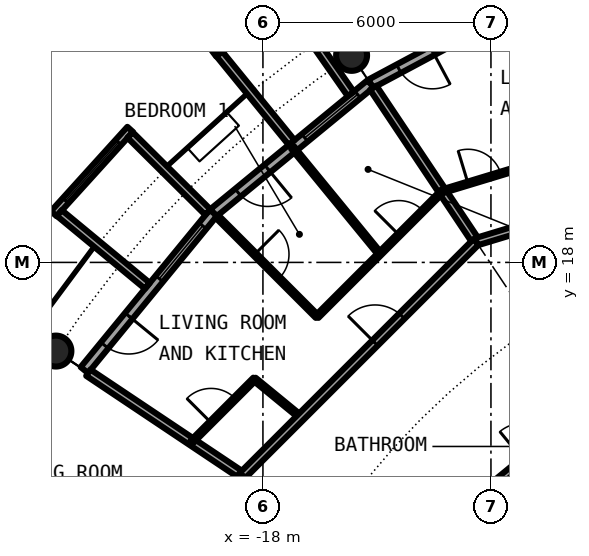
"""IFC4 building model, lengths in metres.
Left out: names, types, materials, properties, quantities, classifications, styles, units other than length and angle.
Written with IfcOpenShell. Run it as: python <this file> out.ifc"""

import sys

from ifc_helpers import new_model, si_unit, direction, frame, frame_2d, origin, origin_2d, place, context, subcontext, project, spatial, rectangle, circle, hollow_circle, extrude, element, fill, save


model = new_model("IFC4")
c1 = context("Model", 3, precision=1e-05, world=origin(), true_north=direction((0.0, 1.0)))
c2 = subcontext(c1, "Body", "Model", "MODEL_VIEW")
j1 = project(units=[si_unit("LENGTHUNIT", "METRE"), si_unit("PLANEANGLEUNIT", "RADIAN")], contexts=[c1])
p1 = place(None, origin())
s1 = spatial("IfcSite", under=j1, at=p1, CompositionType="ELEMENT")
p2 = place(p1, origin())
s2 = spatial("IfcBuilding", under=s1, at=p2, CompositionType="ELEMENT")
p3 = place(p2, frame((0.0, 0.0, 202.4)))
s3 = spatial("IfcBuildingStorey", under=s2, at=p3, CompositionType="ELEMENT", Elevation=202.4)
for number, where, z_axis, x_axis in (
    (1, (-15.667, 23.448, 0.0), (0.0, 0.0, 1.0), (1.0, 0.0, 0.0)),
    (2, (-23.448, 15.667, 0.0), (0.0, 0.0, 1.0), (1.0, 0.0, 0.0)),
):
    element("IfcColumn", number, at=place(p3, frame(where, z_axis=z_axis, x_axis=x_axis)), inside=s3, PredefinedType="COLUMN", context=c2, shape_type="SweptSolid", body=[
        extrude(hollow_circle(Radius=0.406, WallThickness=0.03, at=origin_2d()), origin(), (0.0, 0.0, 1.0), 3.05),
    ])
p4 = place(p3, frame((-10.447, 25.222, 0.0), z_axis=(0.0, 0.0, 1.0), x_axis=(-0.881915646801, -0.471407246368, 0.0)))
e3 = element("IfcWall", 3, at=p4, inside=s3, PredefinedType="SOLIDWALL", context=c2, shape_type="SweptSolid", body=[
    extrude(rectangle(XDim=5.352, YDim=0.25, at=frame_2d((2.676, 0.0))), origin(), (0.0, 0.0, 1.0), 2.7),
])
p5 = place(p4, frame((0.441, 0.0, 0.3)))
e4 = element("IfcOpeningElement", 4, at=p5, cuts=e3, PredefinedType="OPENING", context=c2, shape_type="SweptSolid", body=[
    extrude(rectangle(XDim=1.8, YDim=2.1, at=frame_2d((0.9, 1.05))), frame((0.0, 0.135, 0.0), z_axis=(0.0, -1.0, 0.0), x_axis=(1.0, 0.0, 0.0)), (0.0, 0.0, 1.0), 0.27),
])
p6 = place(p4, frame((3.51, 0.0, 0.0)))
e5 = element("IfcOpeningElement", 5, at=p6, cuts=e3, PredefinedType="OPENING", context=c2, shape_type="SweptSolid", body=[
    extrude(rectangle(XDim=1.0, YDim=2.2, at=frame_2d((0.5, 1.1))), frame((0.0, 0.135, 0.0), z_axis=(0.0, -1.0, 0.0), x_axis=(1.0, 0.0, 0.0)), (0.0, 0.0, 1.0), 0.27),
])
p7 = place(p3, frame((-15.167, 22.699, 0.0), z_axis=(0.0, 0.0, 1.0), x_axis=(-0.773019449054, -0.634382322723, 0.0)))
e6 = element("IfcWall", 6, at=p7, inside=s3, PredefinedType="SOLIDWALL", context=c2, shape_type="SweptSolid", body=[
    extrude(rectangle(XDim=5.352, YDim=0.25, at=frame_2d((2.676, 0.0))), origin(), (0.0, 0.0, 1.0), 2.7),
])
p8 = place(p7, frame((0.441, 0.0, 0.3)))
e7 = element("IfcOpeningElement", 7, at=p8, cuts=e6, PredefinedType="OPENING", context=c2, shape_type="SweptSolid", body=[
    extrude(rectangle(XDim=1.8, YDim=2.1, at=frame_2d((0.9, 1.05))), frame((0.0, 0.135, 0.0), z_axis=(0.0, -1.0, 0.0), x_axis=(1.0, 0.0, 0.0)), (0.0, 0.0, 1.0), 0.27),
])
p9 = place(p7, frame((3.51, 0.0, 0.0)))
e8 = element("IfcOpeningElement", 8, at=p9, cuts=e6, PredefinedType="OPENING", context=c2, shape_type="SweptSolid", body=[
    extrude(rectangle(XDim=1.0, YDim=2.2, at=frame_2d((0.5, 1.1))), frame((0.0, 0.135, 0.0), z_axis=(0.0, -1.0, 0.0), x_axis=(1.0, 0.0, 0.0)), (0.0, 0.0, 1.0), 0.27),
])
p10 = place(p3, frame((-17.337, 24.972, -0.03), z_axis=(0.0, 0.0, 1.0), x_axis=(-0.797887588059, -0.602806268067, 0.0)))
e9 = element("IfcWall", 9, at=p10, inside=s3, PredefinedType="SOLIDWALL", context=c2, shape_type="SweptSolid", body=[
    extrude(rectangle(XDim=2.447, YDim=0.2, at=frame_2d((1.223, 0.0))), origin(), (0.0, 0.0, 1.0), 2.73),
])
p11 = place(p10, frame((0.183, 0.0, 0.33)))
e10 = element("IfcOpeningElement", 10, at=p11, cuts=e9, PredefinedType="OPENING", context=c2, shape_type="SweptSolid", body=[
    extrude(circle(Radius=1.04, at=frame_2d((1.04, 1.04))), frame((0.0, 0.11, 0.0), z_axis=(0.0, -1.0, 0.0), x_axis=(1.0, 0.0, 0.0)), (0.0, 0.0, 1.0), 0.22),
])
p12 = place(p3, frame((-15.688, 22.433, -0.03), z_axis=(0.0, 0.0, 1.0), x_axis=(-0.573260687834, 0.819373043115, 0.0)))
e11 = element("IfcWall", 11, at=p12, inside=s3, PredefinedType="SOLIDWALL", context=c2, shape_type="SweptSolid", body=[
    extrude(rectangle(XDim=2.925, YDim=0.2, at=frame_2d((1.463, 0.0))), origin(), (0.0, 0.0, 1.0), 2.73),
])
p13 = place(p3, frame((-17.246, 21.155, -0.03), z_axis=(0.0, 0.0, 1.0), x_axis=(-0.631741648902, 0.775179004516, 0.0)))
e12 = element("IfcWall", 12, at=p13, inside=s3, PredefinedType="SOLIDWALL", context=c2, shape_type="SweptSolid", body=[
    extrude(rectangle(XDim=3.006, YDim=0.2, at=frame_2d((1.503, 0.0))), origin(), (0.0, 0.0, 1.0), 2.73),
])
p14 = place(p3, frame((-19.304, 19.304, 0.0), z_axis=(0.0, 0.0, 1.0), x_axis=(-0.634382322723, -0.773019449054, 0.0)))
e13 = element("IfcWall", 13, at=p14, inside=s3, PredefinedType="SOLIDWALL", context=c2, shape_type="SweptSolid", body=[
    extrude(rectangle(XDim=5.352, YDim=0.25, at=frame_2d((2.676, 0.0))), origin(), (0.0, 0.0, 1.0), 2.7),
])
p15 = place(p14, frame((0.441, 0.0, 0.3)))
e14 = element("IfcOpeningElement", 14, at=p15, cuts=e13, PredefinedType="OPENING", context=c2, shape_type="SweptSolid", body=[
    extrude(rectangle(XDim=1.8, YDim=2.1, at=frame_2d((0.9, 1.05))), frame((0.0, 0.135, 0.0), z_axis=(0.0, -1.0, 0.0), x_axis=(1.0, 0.0, 0.0)), (0.0, 0.0, 1.0), 0.27),
])
p16 = place(p14, frame((3.51, 0.0, 0.0)))
e15 = element("IfcOpeningElement", 15, at=p16, cuts=e13, PredefinedType="OPENING", context=c2, shape_type="SweptSolid", body=[
    extrude(rectangle(XDim=1.0, YDim=2.2, at=frame_2d((0.5, 1.1))), frame((0.0, 0.135, 0.0), z_axis=(0.0, -1.0, 0.0), x_axis=(1.0, 0.0, 0.0)), (0.0, 0.0, 1.0), 0.27),
])
p17 = place(p3, frame((-21.493, 21.5, -0.03), z_axis=(0.0, 0.0, 1.0), x_axis=(-0.671506829416, -0.740998365753, 0.0)))
e16 = element("IfcWall", 16, at=p17, inside=s3, PredefinedType="SOLIDWALL", context=c2, shape_type="SweptSolid", body=[
    extrude(rectangle(XDim=2.993, YDim=0.2, at=frame_2d((1.497, 0.0))), origin(), (0.0, 0.0, 1.0), 2.73),
])
p18 = place(p17, frame((0.457, 0.0, 0.33)))
e17 = element("IfcOpeningElement", 17, at=p18, cuts=e16, PredefinedType="OPENING", context=c2, shape_type="SweptSolid", body=[
    extrude(circle(Radius=1.04, at=frame_2d((1.04, 1.04))), frame((0.0, 0.11, 0.0), z_axis=(0.0, -1.0, 0.0), x_axis=(1.0, 0.0, 0.0)), (0.0, 0.0, 1.0), 0.22),
])
p19 = place(p3, frame((-19.45, 19.323, -0.03), z_axis=(0.0, 0.0, 1.0), x_axis=(-0.709727076896, 0.704476739375, 0.0)))
e18 = element("IfcWall", 18, at=p19, inside=s3, PredefinedType="SOLIDWALL", context=c2, shape_type="SweptSolid", body=[
    extrude(rectangle(XDim=2.883, YDim=0.2, at=frame_2d((1.441, 0.0))), origin(), (0.0, 0.0, 1.0), 2.73),
])
p20 = place(p3, frame((-21.041, 17.384, -0.03), z_axis=(0.0, 0.0, 1.0), x_axis=(-0.770784861449, 0.63709551667, 0.0)))
e19 = element("IfcWall", 19, at=p20, inside=s3, PredefinedType="SOLIDWALL", context=c2, shape_type="SweptSolid", body=[
    extrude(rectangle(XDim=3.006, YDim=0.2, at=frame_2d((1.503, 0.0))), origin(), (0.0, 0.0, 1.0), 2.73),
])
p21 = place(p3, frame((-18.224, 14.927, 0.0), z_axis=(0.0, 0.0, 1.0), x_axis=(0.773446828454, -0.633861186344, 0.0)))
e20 = element("IfcWall", 20, at=p21, inside=s3, PredefinedType="PARTITIONING", context=c2, shape_type="SweptSolid", body=[
    extrude(rectangle(XDim=1.578, YDim=0.1, at=frame_2d((0.789, 0.0))), origin(), (0.0, 0.0, 1.0), 2.7),
])
p22 = place(p3, frame((-22.595, 15.098, 0.0), z_axis=(0.0, 0.0, 1.0), x_axis=(0.831387096605, -0.55569370664, 0.0)))
e21 = element("IfcWall", 21, at=p22, inside=s3, PredefinedType="PARTITIONING", context=c2, shape_type="SweptSolid", body=[
    extrude(rectangle(XDim=4.875, YDim=0.2, at=frame_2d((2.438, 0.0))), origin(), (0.0, 0.0, 1.0), 2.7),
])
p23 = place(p3, frame((-19.216, 19.216, 0.0), z_axis=(0.0, 0.0, 1.0), x_axis=(0.707106781187, -0.707106781187, 0.0)))
e22 = element("IfcWall", 22, at=p23, inside=s3, PredefinedType="PARTITIONING", context=c2, shape_type="SweptSolid", body=[
    extrude(rectangle(XDim=3.735, YDim=0.1, at=frame_2d((1.868, 0.0))), origin(), (0.0, 0.0, 1.0), 2.7),
])
p24 = place(p23, frame((1.417, 0.0, 0.0)))
e23 = element("IfcOpeningElement", 23, at=p24, cuts=e22, PredefinedType="OPENING", context=c2, shape_type="SweptSolid", body=[
    extrude(rectangle(XDim=0.9, YDim=2.3, at=frame_2d((0.45, 1.15))), frame((0.0, 0.06, 0.0), z_axis=(0.0, -1.0, 0.0), x_axis=(1.0, 0.0, 0.0)), (0.0, 0.0, 1.0), 0.12),
])
p25 = place(p3, frame((-17.22, 21.023, 0.0), z_axis=(0.0, 0.0, 1.0), x_axis=(0.633737383709, -0.773548271597, 0.0)))
e24 = element("IfcWall", 24, at=p25, inside=s3, PredefinedType="PARTITIONING", context=c2, shape_type="SweptSolid", body=[
    extrude(rectangle(XDim=3.618, YDim=0.1, at=frame_2d((1.809, 0.0))), origin(), (0.0, 0.0, 1.0), 2.7),
])
p26 = place(p3, frame((-15.098, 22.595, 0.0), z_axis=(0.0, 0.0, 1.0), x_axis=(0.55569370664, -0.831387096605, 0.0)))
e25 = element("IfcWall", 25, at=p26, inside=s3, PredefinedType="PARTITIONING", context=c2, shape_type="SweptSolid", body=[
    extrude(rectangle(XDim=4.875, YDim=0.2, at=frame_2d((2.438, 0.0))), origin(), (0.0, 0.0, 1.0), 2.7),
])
p27 = place(p3, frame((-14.717, 9.834, 0.0), z_axis=(0.0, 0.0, 1.0), x_axis=(0.773034536097, 0.634363938131, 0.0)))
e26 = element("IfcWall", 26, at=p27, inside=s3, PredefinedType="PARTITIONING", context=c2, shape_type="SweptSolid", body=[
    extrude(rectangle(XDim=10.277, YDim=0.2, at=frame_2d((5.138, 0.0))), origin(), (0.0, 0.0, 1.0), 2.7),
])
p28 = place(p27, frame((4.638, 0.0, 0.0)))
e27 = element("IfcOpeningElement", 27, at=p28, cuts=e26, PredefinedType="OPENING", context=c2, shape_type="SweptSolid", body=[
    extrude(rectangle(XDim=1.0, YDim=2.3, at=frame_2d((0.5, 1.15))), frame((0.0, 0.11, 0.0), z_axis=(0.0, -1.0, 0.0), x_axis=(1.0, 0.0, 0.0)), (0.0, 0.0, 1.0), 0.22),
])
p29 = place(p3, frame((-12.389, 18.542, 0.0), z_axis=(0.0, 0.0, 1.0), x_axis=(0.956994750783, 0.290105234311, 0.0)))
e28 = element("IfcWall", 28, at=p29, inside=s3, PredefinedType="PARTITIONING", context=c2, shape_type="SweptSolid", body=[
    extrude(rectangle(XDim=12.951, YDim=0.2, at=frame_2d((6.475, 0.0))), origin(), (0.0, 0.0, 1.0), 2.7),
])
p30 = place(p29, frame((5.974, 0.0, 0.0)))
e29 = element("IfcOpeningElement", 29, at=p30, cuts=e28, PredefinedType="OPENING", context=c2, shape_type="SweptSolid", body=[
    extrude(rectangle(XDim=1.0, YDim=2.3, at=frame_2d((0.5, 1.15))), frame((0.0, 0.11, 0.0), z_axis=(0.0, -1.0, 0.0), x_axis=(1.0, 0.0, 0.0)), (0.0, 0.0, 1.0), 0.22),
])
p31 = place(p3, frame((-18.542, 12.389, 0.0), z_axis=(0.0, 0.0, 1.0), x_axis=(0.707106781187, 0.707106781187, 0.0)))
e30 = element("IfcWall", 30, at=p31, inside=s3, PredefinedType="PARTITIONING", context=c2, shape_type="SweptSolid", body=[
    extrude(rectangle(XDim=8.702, YDim=0.2, at=frame_2d((4.351, 0.0))), origin(), (0.0, 0.0, 1.0), 2.7),
])
p32 = place(p31, frame((4.938, 0.0, 0.0)))
e31 = element("IfcOpeningElement", 31, at=p32, cuts=e30, PredefinedType="OPENING", context=c2, shape_type="SweptSolid", body=[
    extrude(rectangle(XDim=1.0, YDim=2.3, at=frame_2d((0.5, 1.15))), frame((0.0, 0.11, 0.0), z_axis=(0.0, -1.0, 0.0), x_axis=(1.0, 0.0, 0.0)), (0.0, 0.0, 1.0), 0.22),
])
p33 = place(p3, frame((-19.317, 10.915, 0.0), z_axis=(0.0, 0.0, 1.0), x_axis=(0.465359652486, 0.885121683068, 0.0)))
e32 = element("IfcWall", 32, at=p33, inside=s3, PredefinedType="PARTITIONING", context=c2, shape_type="SweptSolid", body=[
    extrude(rectangle(XDim=1.665, YDim=0.2, at=frame_2d((0.833, 0.0))), origin(), (0.0, 0.0, 1.0), 2.7),
])
p34 = place(p3, frame((-13.278, 19.872, 0.0), z_axis=(0.0, 0.0, 1.0), x_axis=(0.956994210955, 0.29010701508, 0.0)))
e33 = element("IfcWall", 33, at=p34, inside=s3, PredefinedType="PARTITIONING", context=c2, shape_type="SweptSolid", body=[
    extrude(rectangle(XDim=2.312, YDim=0.1, at=frame_2d((1.156, 0.0))), origin(), (0.0, 0.0, 1.0), 2.7),
])
p35 = place(p34, frame((0.706, 0.0, 0.0)))
e34 = element("IfcOpeningElement", 34, at=p35, cuts=e33, PredefinedType="OPENING", context=c2, shape_type="SweptSolid", body=[
    extrude(rectangle(XDim=0.9, YDim=2.3, at=frame_2d((0.45, 1.15))), frame((0.0, 0.06, 0.0), z_axis=(0.0, -1.0, 0.0), x_axis=(1.0, 0.0, 0.0)), (0.0, 0.0, 1.0), 0.12),
])
p36 = place(p3, frame((-19.867, 13.283, 0.0), z_axis=(0.0, 0.0, 1.0), x_axis=(0.707106781187, 0.707106781187, 0.0)))
e35 = element("IfcWall", 35, at=p36, inside=s3, PredefinedType="PARTITIONING", context=c2, shape_type="SweptSolid", body=[
    extrude(rectangle(XDim=2.332, YDim=0.1, at=frame_2d((1.166, 0.0))), origin(), (0.0, 0.0, 1.0), 2.7),
])
p37 = place(p36, frame((0.709, 0.0, 0.0)))
e36 = element("IfcOpeningElement", 36, at=p37, cuts=e35, PredefinedType="OPENING", context=c2, shape_type="SweptSolid", body=[
    extrude(rectangle(XDim=0.9, YDim=2.3, at=frame_2d((0.45, 1.15))), frame((0.0, 0.06, 0.0), z_axis=(0.0, -1.0, 0.0), x_axis=(1.0, 0.0, 0.0)), (0.0, 0.0, 1.0), 0.12),
])
p38 = place(p3, frame((-16.575, 16.575, 0.0), z_axis=(0.0, 0.0, 1.0), x_axis=(0.707080600289, 0.707132961115, 0.0)))
e37 = element("IfcWall", 37, at=p38, inside=s3, PredefinedType="PARTITIONING", context=c2, shape_type="SweptSolid", body=[
    extrude(rectangle(XDim=4.663, YDim=0.1, at=frame_2d((2.331, 0.0))), origin(), (0.0, 0.0, 1.0), 2.7),
])
p39 = place(p38, frame((3.043, 0.0, 0.0)))
e38 = element("IfcOpeningElement", 38, at=p39, cuts=e37, PredefinedType="OPENING", context=c2, shape_type="SweptSolid", body=[
    extrude(rectangle(XDim=0.9, YDim=2.3, at=frame_2d((0.45, 1.15))), frame((0.0, 0.06, 0.0), z_axis=(0.0, -1.0, 0.0), x_axis=(1.0, 0.0, 0.0)), (0.0, 0.0, 1.0), 0.12),
])
p40 = place(p6, origin())
e39 = element("IfcDoor", 39, at=p40, inside=s3, OperationType="SINGLE_SWING_LEFT", PredefinedType="DOOR", context=c2, shape_type="SweptSolid", body=[
    extrude(rectangle(XDim=1.0, YDim=2.2, at=frame_2d((0.5, 1.1))), frame((0.0, 0.025, 0.0), z_axis=(0.0, -1.0, 0.0), x_axis=(1.0, 0.0, 0.0)), (0.0, 0.0, 1.0), 0.05),
])
fill(e5, e39)
p41 = place(p8, origin())
e40 = element("IfcWindow", 40, at=p41, inside=s3, PartitioningType="SINGLE_PANEL", PredefinedType="WINDOW", context=c2, shape_type="SweptSolid", body=[
    extrude(rectangle(XDim=1.8, YDim=2.1, at=frame_2d((0.9, 1.05))), frame((0.0, 0.03, 0.0), z_axis=(0.0, -1.0, 0.0), x_axis=(1.0, 0.0, 0.0)), (0.0, 0.0, 1.0), 0.06),
])
fill(e7, e40)
p42 = place(p9, origin())
e41 = element("IfcDoor", 41, at=p42, inside=s3, OperationType="SINGLE_SWING_LEFT", PredefinedType="DOOR", context=c2, shape_type="SweptSolid", body=[
    extrude(rectangle(XDim=1.0, YDim=2.2, at=frame_2d((0.5, 1.1))), frame((0.0, 0.025, 0.0), z_axis=(0.0, -1.0, 0.0), x_axis=(1.0, 0.0, 0.0)), (0.0, 0.0, 1.0), 0.05),
])
fill(e8, e41)
p43 = place(p15, origin())
e42 = element("IfcWindow", 42, at=p43, inside=s3, PartitioningType="SINGLE_PANEL", PredefinedType="WINDOW", context=c2, shape_type="SweptSolid", body=[
    extrude(rectangle(XDim=1.8, YDim=2.1, at=frame_2d((0.9, 1.05))), frame((0.0, 0.03, 0.0), z_axis=(0.0, -1.0, 0.0), x_axis=(1.0, 0.0, 0.0)), (0.0, 0.0, 1.0), 0.06),
])
fill(e14, e42)
p44 = place(p18, origin())
e43 = element("IfcWindow", 43, at=p44, inside=s3, PartitioningType="SINGLE_PANEL", PredefinedType="WINDOW", context=c2, shape_type="SweptSolid", body=[
    extrude(circle(Radius=1.04, at=frame_2d((1.04, 1.04))), frame((0.0, 0.03, 0.0), z_axis=(0.0, -1.0, 0.0), x_axis=(1.0, 0.0, 0.0)), (0.0, 0.0, 1.0), 0.06),
])
fill(e17, e43)
p45 = place(p16, origin())
e44 = element("IfcDoor", 44, at=p45, inside=s3, OperationType="SINGLE_SWING_LEFT", PredefinedType="DOOR", context=c2, shape_type="SweptSolid", body=[
    extrude(rectangle(XDim=1.0, YDim=2.2, at=frame_2d((0.5, 1.1))), frame((0.0, 0.025, 0.0), z_axis=(0.0, -1.0, 0.0), x_axis=(1.0, 0.0, 0.0)), (0.0, 0.0, 1.0), 0.05),
])
fill(e15, e44)
p46 = place(p35, origin())
e45 = element("IfcDoor", 45, at=p46, inside=s3, OperationType="SINGLE_SWING_LEFT", PredefinedType="DOOR", context=c2, shape_type="SweptSolid", body=[
    extrude(rectangle(XDim=0.9, YDim=2.3, at=frame_2d((0.45, 1.15))), frame((0.0, 0.025, 0.0), z_axis=(0.0, -1.0, 0.0), x_axis=(1.0, 0.0, 0.0)), (0.0, 0.0, 1.0), 0.05),
])
fill(e34, e45)
p47 = place(p32, origin())
e46 = element("IfcDoor", 46, at=p47, inside=s3, OperationType="SINGLE_SWING_RIGHT", PredefinedType="DOOR", context=c2, shape_type="SweptSolid", body=[
    extrude(rectangle(XDim=1.0, YDim=2.3, at=frame_2d((0.5, 1.15))), frame((0.0, 0.025, 0.0), z_axis=(0.0, -1.0, 0.0), x_axis=(1.0, 0.0, 0.0)), (0.0, 0.0, 1.0), 0.05),
])
fill(e31, e46)
p48 = place(p37, origin())
e47 = element("IfcDoor", 47, at=p48, inside=s3, OperationType="SINGLE_SWING_LEFT", PredefinedType="DOOR", context=c2, shape_type="SweptSolid", body=[
    extrude(rectangle(XDim=0.9, YDim=2.3, at=frame_2d((0.45, 1.15))), frame((0.0, 0.025, 0.0), z_axis=(0.0, -1.0, 0.0), x_axis=(1.0, 0.0, 0.0)), (0.0, 0.0, 1.0), 0.05),
])
fill(e36, e47)
p49 = place(p24, origin())
e48 = element("IfcDoor", 48, at=p49, inside=s3, OperationType="SINGLE_SWING_LEFT", PredefinedType="DOOR", context=c2, shape_type="SweptSolid", body=[
    extrude(rectangle(XDim=0.9, YDim=2.3, at=frame_2d((0.45, 1.15))), frame((0.0, 0.025, 0.0), z_axis=(0.0, -1.0, 0.0), x_axis=(1.0, 0.0, 0.0)), (0.0, 0.0, 1.0), 0.05),
])
fill(e23, e48)
p50 = place(p39, origin())
e49 = element("IfcDoor", 49, at=p50, inside=s3, OperationType="SINGLE_SWING_RIGHT", PredefinedType="DOOR", context=c2, shape_type="SweptSolid", body=[
    extrude(rectangle(XDim=0.9, YDim=2.3, at=frame_2d((0.45, 1.15))), frame((0.0, 0.025, 0.0), z_axis=(0.0, -1.0, 0.0), x_axis=(1.0, 0.0, 0.0)), (0.0, 0.0, 1.0), 0.05),
])
fill(e38, e49)
save(model, sys.argv[1])
